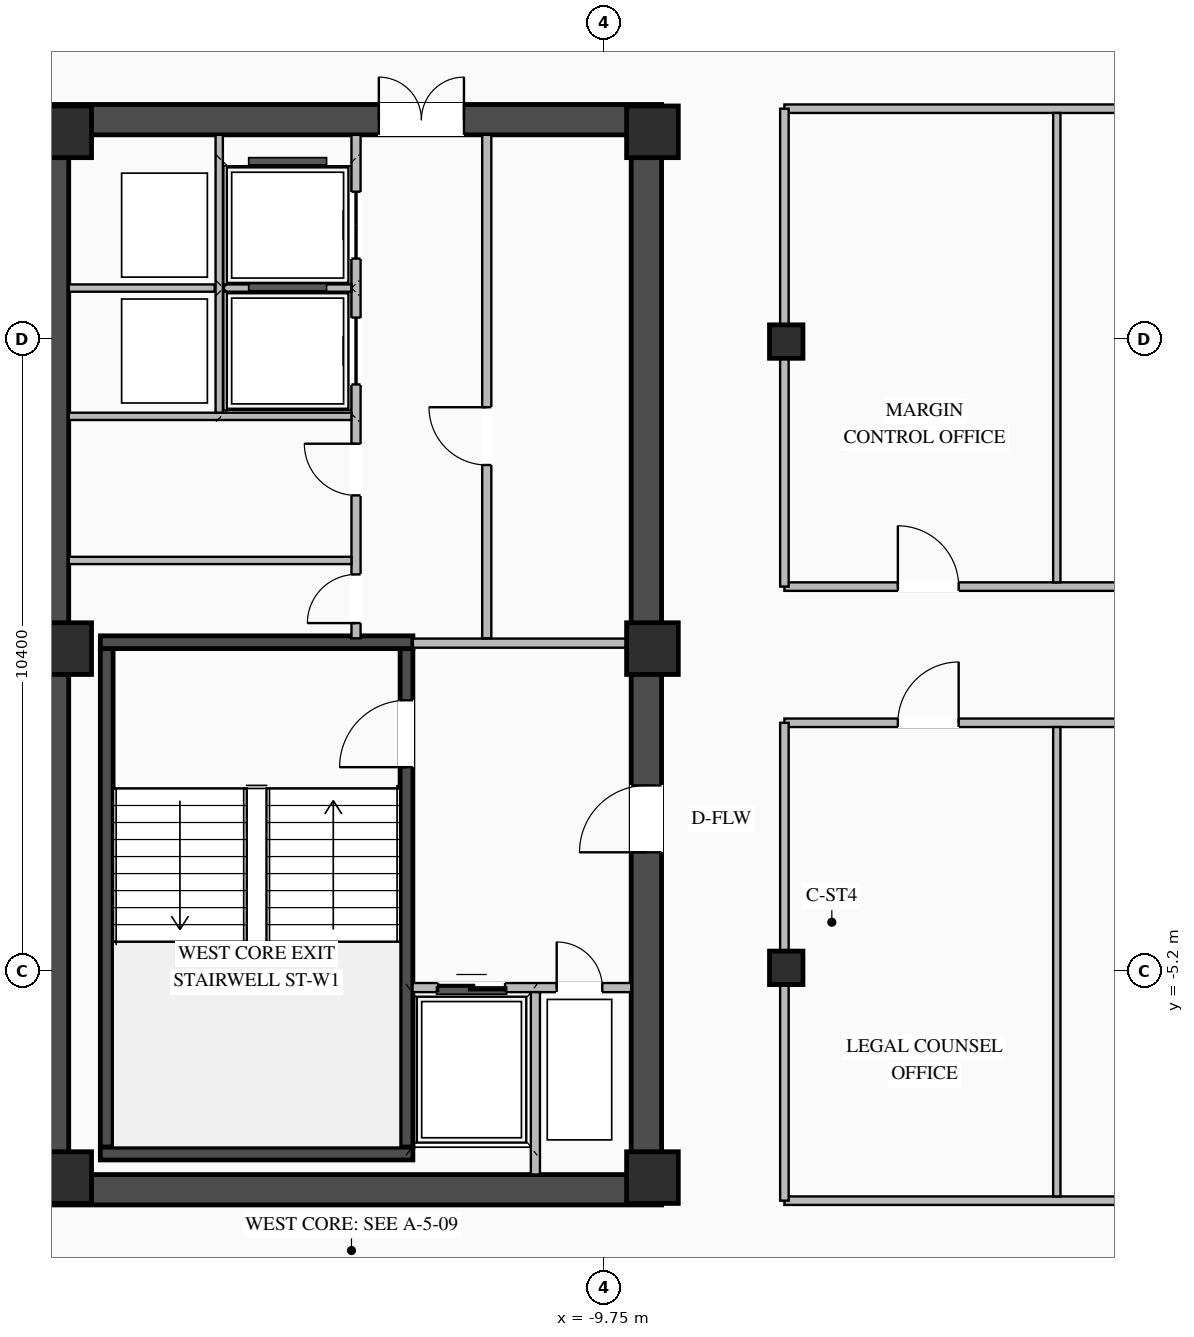
"""IFC4 building model, lengths in metres.
Left out: names, types, materials, properties, quantities, classifications, styles, units other than length and angle.
Written with IfcOpenShell. Run it as: python <this file> out.ifc"""

import sys

from ifc_helpers import new_model, si_unit, direction, frame, frame_2d, origin, origin_2d, place, context, subcontext, project, spatial, rectangle, i_section, extrude, element, fill, save


model = new_model("IFC4")
c1 = context("Model", 3, precision=1e-05, world=origin(), true_north=direction((0.0, 1.0)))
c2 = subcontext(c1, "Body", "Model", "MODEL_VIEW")
j1 = project(units=[si_unit("LENGTHUNIT", "METRE"), si_unit("PLANEANGLEUNIT", "RADIAN")], contexts=[c1])
p1 = place(None, origin())
s1 = spatial("IfcSite", under=j1, at=p1, CompositionType="ELEMENT")
p2 = place(p1, origin())
s2 = spatial("IfcBuilding", under=s1, at=p2, CompositionType="ELEMENT")
p3 = place(p2, frame((0.0, 0.0, 229.2)))
s3 = spatial("IfcBuildingStorey", under=s2, at=p3, CompositionType="ELEMENT", Elevation=229.2)
p4 = place(p3, frame((-19.05, -8.8, 0.0), z_axis=(0.0, 0.0, 1.0), x_axis=(1.0, 0.0, 0.0)))
e1 = element("IfcWall", 1, at=p4, inside=s3, PredefinedType="SHEAR", context=c2, shape_type="SweptSolid", body=[
    extrude(rectangle(XDim=10.25, YDim=0.5, at=frame_2d((5.125, 0.0))), origin(), (0.0, 0.0, 1.0), 3.27),
])
p5 = place(p3, frame((-19.05, 8.8, 0.0), z_axis=(0.0, 0.0, 1.0), x_axis=(1.0, 0.0, 0.0)))
e2 = element("IfcWall", 2, at=p5, inside=s3, PredefinedType="SHEAR", context=c2, shape_type="SweptSolid", body=[
    extrude(rectangle(XDim=10.25, YDim=0.5, at=frame_2d((5.125, 0.0))), origin(), (0.0, 0.0, 1.0), 3.27),
])
p6 = place(p5, frame((5.6, 0.0, 0.0)))
e3 = element("IfcOpeningElement", 3, at=p6, cuts=e2, PredefinedType="OPENING", context=c2, shape_type="SweptSolid", body=[
    extrude(rectangle(XDim=1.4, YDim=2.05, at=frame_2d((0.7, 1.025))), frame((0.0, 0.26, 0.0), z_axis=(0.0, -1.0, 0.0), x_axis=(1.0, 0.0, 0.0)), (0.0, 0.0, 1.0), 0.52),
])
p7 = place(p3, frame((-18.8, -8.55, 0.0), z_axis=(0.0, 0.0, 1.0), x_axis=(0.0, 1.0, 0.0)))
e4 = element("IfcWall", 4, at=p7, inside=s3, PredefinedType="SHEAR", context=c2, shape_type="SweptSolid", body=[
    extrude(rectangle(XDim=17.1, YDim=0.5, at=frame_2d((8.55, 0.0))), origin(), (0.0, 0.0, 1.0), 3.27),
])
p8 = place(p3, frame((-9.05, -8.55, 0.0), z_axis=(0.0, 0.0, 1.0), x_axis=(0.0, 1.0, 0.0)))
e5 = element("IfcWall", 5, at=p8, inside=s3, PredefinedType="SHEAR", context=c2, shape_type="SweptSolid", body=[
    extrude(rectangle(XDim=17.1, YDim=0.5, at=frame_2d((8.55, 0.0))), origin(), (0.0, 0.0, 1.0), 3.27),
])
p9 = place(p8, frame((5.3, 0.0, 0.0)))
e6 = element("IfcOpeningElement", 6, at=p9, cuts=e5, PredefinedType="OPENING", context=c2, shape_type="SweptSolid", body=[
    extrude(rectangle(XDim=1.1, YDim=2.08, at=frame_2d((0.55, 1.04))), frame((0.0, 0.26, 0.0), z_axis=(0.0, -1.0, 0.0), x_axis=(1.0, 0.0, 0.0)), (0.0, 0.0, 1.0), 0.52),
])
p10 = place(p3, frame((-12.995, -8.1, 0.0), z_axis=(0.0, 0.0, 1.0), x_axis=(0.0, 1.0, 0.0)))
e7 = element("IfcWall", 7, at=p10, inside=s3, PredefinedType="SHEAR", context=c2, shape_type="SweptSolid", body=[
    extrude(rectangle(XDim=8.2, YDim=0.21, at=frame_2d((4.1, 0.0))), origin(), (0.0, 0.0, 1.0), 3.27),
])
p11 = place(p10, frame((6.25, 0.0, 0.0)))
e8 = element("IfcOpeningElement", 8, at=p11, cuts=e7, PredefinedType="OPENING", context=c2, shape_type="SweptSolid", body=[
    extrude(rectangle(XDim=1.1, YDim=2.15, at=frame_2d((0.55, 1.075))), frame((0.0, 0.115, 0.0), z_axis=(0.0, -1.0, 0.0), x_axis=(1.0, 0.0, 0.0)), (0.0, 0.0, 1.0), 0.23),
])
p12 = place(p3, frame((-17.925, -8.1, 0.0), z_axis=(0.0, 0.0, 1.0), x_axis=(0.0, 1.0, 0.0)))
e9 = element("IfcWall", 9, at=p12, inside=s3, PredefinedType="SHEAR", context=c2, shape_type="SweptSolid", body=[
    extrude(rectangle(XDim=8.2, YDim=0.21, at=frame_2d((4.1, 0.0))), origin(), (0.0, 0.0, 1.0), 3.27),
])
for number, where, z_axis, x_axis in (
    (10, (-18.03, -8.205, 0.0), (0.0, 0.0, 1.0), (1.0, 0.0, 0.0)),
    (11, (-12.89, 0.205, 0.0), (0.0, 0.0, 1.0), (-1.0, 0.0, 0.0)),
):
    element("IfcWall", number, at=place(p3, frame(where, z_axis=z_axis, x_axis=x_axis)), inside=s3, PredefinedType="SHEAR", context=c2, shape_type="SweptSolid", body=[
        extrude(rectangle(XDim=5.14, YDim=0.21, at=frame_2d((2.57, 0.0))), origin(), (0.0, 0.0, 1.0), 3.27),
    ])
for number, where, z_axis, x_axis in (
    (12, (-8.95, -8.6, 0.0), (0.0, 0.0, 1.0), (1.0, 0.0, 0.0)),
    (13, (-8.95, 0.1, 0.0), (0.0, 0.0, 1.0), (1.0, 0.0, 0.0)),
    (14, (-8.95, 8.6, 0.0), (0.0, 0.0, 1.0), (1.0, 0.0, 0.0)),
    (15, (-18.6, -8.6, 0.0), (0.0, 0.0, 1.0), (1.0, 0.0, 0.0)),
    (16, (-18.6, 0.1, 0.0), (0.0, 0.0, 1.0), (1.0, 0.0, 0.0)),
    (17, (-18.6, 8.6, 0.0), (0.0, 0.0, 1.0), (1.0, 0.0, 0.0)),
):
    element("IfcColumn", number, at=place(p3, frame(where, z_axis=z_axis, x_axis=x_axis)), inside=s3, PredefinedType="COLUMN", context=c2, shape_type="SweptSolid", body=[
        extrude(rectangle(XDim=0.85, YDim=0.85, at=origin_2d()), origin(), (0.0, 0.0, 1.0), 3.45),
    ])
for number, where, z_axis, x_axis in (
    (18, (-6.75, -5.15, 0.0), (0.0, 0.0, 1.0), (1.0, 0.0, 0.0)),
    (19, (-6.75, 5.15, 0.0), (0.0, 0.0, 1.0), (1.0, 0.0, 0.0)),
):
    element("IfcColumn", number, at=place(p3, frame(where, z_axis=z_axis, x_axis=x_axis)), inside=s3, PredefinedType="COLUMN", context=c2, shape_type="SweptSolid", body=[
        extrude(i_section(OverallWidth=0.55, OverallDepth=0.55, WebThickness=0.024, FlangeThickness=0.036, at=origin_2d()), origin(), (0.0, 0.0, 1.0), 3.45),
    ])
p13 = place(p3, frame((-12.895, -5.475, 0.0), z_axis=(0.0, 0.0, 1.0), x_axis=(1.0, 0.0, 0.0)))
e20 = element("IfcWall", 20, at=p13, inside=s3, PredefinedType="STANDARD", context=c2, shape_type="SweptSolid", body=[
    extrude(rectangle(XDim=3.595, YDim=0.15, at=frame_2d((1.797, 0.0))), origin(), (0.0, 0.0, 1.0), 3.25),
])
p14 = place(p13, frame((0.42, 0.0, 0.0)))
e21 = element("IfcOpeningElement", 21, at=p14, cuts=e20, PredefinedType="OPENING", context=c2, shape_type="SweptSolid", body=[
    extrude(rectangle(XDim=1.1, YDim=2.15, at=frame_2d((0.55, 1.075))), frame((0.0, 0.085, 0.0), z_axis=(0.0, -1.0, 0.0), x_axis=(1.0, 0.0, 0.0)), (0.0, 0.0, 1.0), 0.17),
])
p15 = place(p13, frame((2.37, 0.0, 0.0)))
e22 = element("IfcOpeningElement", 22, at=p15, cuts=e20, PredefinedType="OPENING", context=c2, shape_type="SweptSolid", body=[
    extrude(rectangle(XDim=0.75, YDim=2.05, at=frame_2d((0.375, 1.025))), frame((0.0, 0.085, 0.0), z_axis=(0.0, -1.0, 0.0), x_axis=(1.0, 0.0, 0.0)), (0.0, 0.0, 1.0), 0.17),
])
p16 = place(p3, frame((-10.875, -8.55, 0.0), z_axis=(0.0, 0.0, 1.0), x_axis=(0.0, 1.0, 0.0)))
e23 = element("IfcWall", 23, at=p16, inside=s3, PredefinedType="STANDARD", context=c2, shape_type="SweptSolid", body=[
    extrude(rectangle(XDim=3.0, YDim=0.15, at=frame_2d((1.5, 0.0))), origin(), (0.0, 0.0, 1.0), 3.25),
])
p17 = place(p3, frame((-12.89, 0.19, 0.0), z_axis=(0.0, 0.0, 1.0), x_axis=(1.0, 0.0, 0.0)))
e24 = element("IfcWall", 24, at=p17, inside=s3, PredefinedType="STANDARD", context=c2, shape_type="SweptSolid", body=[
    extrude(rectangle(XDim=3.59, YDim=0.15, at=frame_2d((1.795, 0.0))), origin(), (0.0, 0.0, 1.0), 2.645),
])
p18 = place(p3, frame((-11.675, 0.27, 0.0), z_axis=(0.0, 0.0, 1.0), x_axis=(0.0, 1.0, 0.0)))
e25 = element("IfcWall", 25, at=p18, inside=s3, PredefinedType="STANDARD", context=c2, shape_type="SweptSolid", body=[
    extrude(rectangle(XDim=8.28, YDim=0.15, at=frame_2d((4.14, 0.0))), origin(), (0.0, 0.0, 1.0), 3.25),
])
p19 = place(p18, frame((2.85, 0.0, 0.0)))
e26 = element("IfcOpeningElement", 26, at=p19, cuts=e25, PredefinedType="OPENING", context=c2, shape_type="SweptSolid", body=[
    extrude(rectangle(XDim=0.95, YDim=2.05, at=frame_2d((0.475, 1.025))), frame((0.0, 0.085, 0.0), z_axis=(0.0, -1.0, 0.0), x_axis=(1.0, 0.0, 0.0)), (0.0, 0.0, 1.0), 0.17),
])
p20 = place(p3, frame((-13.825, 0.27, 0.0), z_axis=(0.0, 0.0, 1.0), x_axis=(0.0, 1.0, 0.0)))
e27 = element("IfcWall", 27, at=p20, inside=s3, PredefinedType="STANDARD", context=c2, shape_type="SweptSolid", body=[
    extrude(rectangle(XDim=8.28, YDim=0.15, at=frame_2d((4.14, 0.0))), origin(), (0.0, 0.0, 1.0), 3.25),
])
p21 = place(p20, frame((4.175, 0.0, 0.0)))
e28 = element("IfcOpeningElement", 28, at=p21, cuts=e27, PredefinedType="OPENING", context=c2, shape_type="SweptSolid", body=[
    extrude(rectangle(XDim=1.1, YDim=2.1, at=frame_2d((0.55, 1.05))), frame((0.0, 0.085, 0.0), z_axis=(0.0, -1.0, 0.0), x_axis=(1.0, 0.0, 0.0)), (0.0, 0.0, 1.0), 0.17),
])
p22 = place(p20, frame((6.245, 0.0, 0.0)))
e29 = element("IfcOpeningElement", 29, at=p22, cuts=e27, PredefinedType="OPENING", context=c2, shape_type="SweptSolid", body=[
    extrude(rectangle(XDim=1.1, YDim=2.1, at=frame_2d((0.55, 1.05))), frame((0.0, 0.085, 0.0), z_axis=(0.0, -1.0, 0.0), x_axis=(1.0, 0.0, 0.0)), (0.0, 0.0, 1.0), 0.17),
])
p23 = place(p20, frame((0.25, 0.0, 0.0)))
e30 = element("IfcOpeningElement", 30, at=p23, cuts=e27, PredefinedType="OPENING", context=c2, shape_type="SweptSolid", body=[
    extrude(rectangle(XDim=0.8, YDim=2.05, at=frame_2d((0.4, 1.025))), frame((0.0, 0.085, 0.0), z_axis=(0.0, -1.0, 0.0), x_axis=(1.0, 0.0, 0.0)), (0.0, 0.0, 1.0), 0.17),
])
p24 = place(p20, frame((2.35, 0.0, 0.0)))
e31 = element("IfcOpeningElement", 31, at=p24, cuts=e27, PredefinedType="OPENING", context=c2, shape_type="SweptSolid", body=[
    extrude(rectangle(XDim=0.85, YDim=2.05, at=frame_2d((0.425, 1.025))), frame((0.0, 0.085, 0.0), z_axis=(0.0, -1.0, 0.0), x_axis=(1.0, 0.0, 0.0)), (0.0, 0.0, 1.0), 0.17),
])
p25 = place(p3, frame((-18.55, 3.92, 0.0), z_axis=(0.0, 0.0, 1.0), x_axis=(1.0, 0.0, 0.0)))
e32 = element("IfcWall", 32, at=p25, inside=s3, PredefinedType="STANDARD", context=c2, shape_type="SweptSolid", body=[
    extrude(rectangle(XDim=4.65, YDim=0.12, at=frame_2d((2.325, 0.0))), origin(), (0.0, 0.0, 1.0), 3.25),
])
p26 = place(p3, frame((-18.55, 6.03, 0.0), z_axis=(0.0, 0.0, 1.0), x_axis=(1.0, 0.0, 0.0)))
e33 = element("IfcWall", 33, at=p26, inside=s3, PredefinedType="STANDARD", context=c2, shape_type="SweptSolid", body=[
    extrude(rectangle(XDim=2.4, YDim=0.12, at=frame_2d((1.2, 0.0))), origin(), (0.0, 0.0, 1.0), 3.25),
])
p27 = place(p3, frame((-16.075, 3.98, 0.0), z_axis=(0.0, 0.0, 1.0), x_axis=(0.0, 1.0, 0.0)))
e34 = element("IfcWall", 34, at=p27, inside=s3, PredefinedType="STANDARD", context=c2, shape_type="SweptSolid", body=[
    extrude(rectangle(XDim=4.57, YDim=0.12, at=frame_2d((2.285, 0.0))), origin(), (0.0, 0.0, 1.0), 3.25),
])
p28 = place(p3, frame((-16.0, 6.03, 0.0), z_axis=(0.0, 0.0, 1.0), x_axis=(1.0, 0.0, 0.0)))
e35 = element("IfcWall", 35, at=p28, inside=s3, PredefinedType="STANDARD", context=c2, shape_type="SweptSolid", body=[
    extrude(rectangle(XDim=2.1, YDim=0.12, at=frame_2d((1.05, 0.0))), origin(), (0.0, 0.0, 1.0), 3.25),
])
p29 = place(p3, frame((-18.55, 1.55, 0.0), z_axis=(0.0, 0.0, 1.0), x_axis=(1.0, 0.0, 0.0)))
e36 = element("IfcWall", 36, at=p29, inside=s3, PredefinedType="STANDARD", context=c2, shape_type="SweptSolid", body=[
    extrude(rectangle(XDim=4.65, YDim=0.12, at=frame_2d((2.325, 0.0))), origin(), (0.0, 0.0, 1.0), 3.25),
])
p30 = place(p3, frame((-6.78, 1.12, 0.0), z_axis=(0.0, 0.0, 1.0), x_axis=(1.0, 0.0, 0.0)))
e37 = element("IfcWall", 37, at=p30, inside=s3, PredefinedType="STANDARD", context=c2, shape_type="SweptSolid", body=[
    extrude(rectangle(XDim=13.56, YDim=0.14, at=frame_2d((6.78, 0.0))), origin(), (0.0, 0.0, 1.0), 3.25),
])
p31 = place(p30, frame((1.866, 0.0, 0.0)))
e38 = element("IfcOpeningElement", 38, at=p31, cuts=e37, PredefinedType="OPENING", context=c2, shape_type="SweptSolid", body=[
    extrude(rectangle(XDim=1.0, YDim=2.08, at=frame_2d((0.5, 1.04))), frame((0.0, 0.08, 0.0), z_axis=(0.0, -1.0, 0.0), x_axis=(1.0, 0.0, 0.0)), (0.0, 0.0, 1.0), 0.16),
])
p32 = place(p30, frame((6.28, 0.0, 0.0)))
e39 = element("IfcOpeningElement", 39, at=p32, cuts=e37, PredefinedType="OPENING", context=c2, shape_type="SweptSolid", body=[
    extrude(rectangle(XDim=1.0, YDim=2.08, at=frame_2d((0.5, 1.04))), frame((0.0, 0.08, 0.0), z_axis=(0.0, -1.0, 0.0), x_axis=(1.0, 0.0, 0.0)), (0.0, 0.0, 1.0), 0.16),
])
p33 = place(p30, frame((10.694, 0.0, 0.0)))
e40 = element("IfcOpeningElement", 40, at=p33, cuts=e37, PredefinedType="OPENING", context=c2, shape_type="SweptSolid", body=[
    extrude(rectangle(XDim=1.0, YDim=2.08, at=frame_2d((0.5, 1.04))), frame((0.0, 0.08, 0.0), z_axis=(0.0, -1.0, 0.0), x_axis=(1.0, 0.0, 0.0)), (0.0, 0.0, 1.0), 0.16),
])
p34 = place(p3, frame((-6.78, 8.98, 0.0), z_axis=(0.0, 0.0, 1.0), x_axis=(1.0, 0.0, 0.0)))
e41 = element("IfcWall", 41, at=p34, inside=s3, PredefinedType="STANDARD", context=c2, shape_type="SweptSolid", body=[
    extrude(rectangle(XDim=13.56, YDim=0.14, at=frame_2d((6.78, 0.0))), origin(), (0.0, 0.0, 1.0), 3.25),
])
p35 = place(p3, frame((-6.78, 1.12, 0.0), z_axis=(0.0, 0.0, 1.0), x_axis=(0.0, 1.0, 0.0)))
e42 = element("IfcWall", 42, at=p35, inside=s3, PredefinedType="STANDARD", context=c2, shape_type="SweptSolid", body=[
    extrude(rectangle(XDim=7.86, YDim=0.14, at=frame_2d((3.93, 0.0))), origin(), (0.0, 0.0, 1.0), 2.645),
])
p36 = place(p3, frame((-2.3, 1.19, 0.0), z_axis=(0.0, 0.0, 1.0), x_axis=(0.0, 1.0, 0.0)))
e43 = element("IfcWall", 43, at=p36, inside=s3, PredefinedType="STANDARD", context=c2, shape_type="SweptSolid", body=[
    extrude(rectangle(XDim=7.72, YDim=0.12, at=frame_2d((3.86, 0.0))), origin(), (0.0, 0.0, 1.0), 3.25),
])
p37 = place(p3, frame((-6.78, -1.12, 0.0), z_axis=(0.0, 0.0, 1.0), x_axis=(1.0, 0.0, 0.0)))
e44 = element("IfcWall", 44, at=p37, inside=s3, PredefinedType="STANDARD", context=c2, shape_type="SweptSolid", body=[
    extrude(rectangle(XDim=13.56, YDim=0.14, at=frame_2d((6.78, 0.0))), origin(), (0.0, 0.0, 1.0), 3.25),
])
p38 = place(p37, frame((1.866, 0.0, 0.0)))
e45 = element("IfcOpeningElement", 45, at=p38, cuts=e44, PredefinedType="OPENING", context=c2, shape_type="SweptSolid", body=[
    extrude(rectangle(XDim=1.0, YDim=2.08, at=frame_2d((0.5, 1.04))), frame((0.0, 0.08, 0.0), z_axis=(0.0, -1.0, 0.0), x_axis=(1.0, 0.0, 0.0)), (0.0, 0.0, 1.0), 0.16),
])
p39 = place(p37, frame((6.28, 0.0, 0.0)))
e46 = element("IfcOpeningElement", 46, at=p39, cuts=e44, PredefinedType="OPENING", context=c2, shape_type="SweptSolid", body=[
    extrude(rectangle(XDim=1.0, YDim=2.08, at=frame_2d((0.5, 1.04))), frame((0.0, 0.08, 0.0), z_axis=(0.0, -1.0, 0.0), x_axis=(1.0, 0.0, 0.0)), (0.0, 0.0, 1.0), 0.16),
])
p40 = place(p37, frame((10.694, 0.0, 0.0)))
e47 = element("IfcOpeningElement", 47, at=p40, cuts=e44, PredefinedType="OPENING", context=c2, shape_type="SweptSolid", body=[
    extrude(rectangle(XDim=1.0, YDim=2.08, at=frame_2d((0.5, 1.04))), frame((0.0, 0.08, 0.0), z_axis=(0.0, -1.0, 0.0), x_axis=(1.0, 0.0, 0.0)), (0.0, 0.0, 1.0), 0.16),
])
p41 = place(p3, frame((-6.78, -8.98, 0.0), z_axis=(0.0, 0.0, 1.0), x_axis=(1.0, 0.0, 0.0)))
e48 = element("IfcWall", 48, at=p41, inside=s3, PredefinedType="STANDARD", context=c2, shape_type="SweptSolid", body=[
    extrude(rectangle(XDim=13.56, YDim=0.14, at=frame_2d((6.78, 0.0))), origin(), (0.0, 0.0, 1.0), 3.25),
])
p42 = place(p3, frame((-6.78, -8.98, 0.0), z_axis=(0.0, 0.0, 1.0), x_axis=(0.0, 1.0, 0.0)))
e49 = element("IfcWall", 49, at=p42, inside=s3, PredefinedType="STANDARD", context=c2, shape_type="SweptSolid", body=[
    extrude(rectangle(XDim=7.86, YDim=0.14, at=frame_2d((3.93, 0.0))), origin(), (0.0, 0.0, 1.0), 2.645),
])
p43 = place(p3, frame((-2.3, -8.91, 0.0), z_axis=(0.0, 0.0, 1.0), x_axis=(0.0, 1.0, 0.0)))
e50 = element("IfcWall", 50, at=p43, inside=s3, PredefinedType="STANDARD", context=c2, shape_type="SweptSolid", body=[
    extrude(rectangle(XDim=7.72, YDim=0.12, at=frame_2d((3.86, 0.0))), origin(), (0.0, 0.0, 1.0), 3.25),
])
p44 = place(p11, origin())
e51 = element("IfcDoor", 51, at=p44, inside=s3, OperationType="SINGLE_SWING_LEFT", PredefinedType="DOOR", context=c2, shape_type="SweptSolid", body=[
    extrude(rectangle(XDim=1.1, YDim=2.15, at=frame_2d((0.55, 1.075))), frame((0.0, 0.025, 0.0), z_axis=(0.0, -1.0, 0.0), x_axis=(1.0, 0.0, 0.0)), (0.0, 0.0, 1.0), 0.05),
])
fill(e8, e51)
p45 = place(p14, origin())
e52 = element("IfcDoor", 52, at=p45, inside=s3, OperationType="DOUBLE_DOOR_SLIDING", PredefinedType="DOOR", context=c2, shape_type="SweptSolid", body=[
    extrude(rectangle(XDim=1.1, YDim=2.15, at=frame_2d((0.55, 1.075))), frame((0.0, 0.025, 0.0), z_axis=(0.0, -1.0, 0.0), x_axis=(1.0, 0.0, 0.0)), (0.0, 0.0, 1.0), 0.05),
])
fill(e21, e52)
p46 = place(p15, origin())
e53 = element("IfcDoor", 53, at=p46, inside=s3, OperationType="SINGLE_SWING_LEFT", PredefinedType="DOOR", context=c2, shape_type="SweptSolid", body=[
    extrude(rectangle(XDim=0.75, YDim=2.05, at=frame_2d((0.375, 1.025))), frame((0.0, 0.025, 0.0), z_axis=(0.0, -1.0, 0.0), x_axis=(1.0, 0.0, 0.0)), (0.0, 0.0, 1.0), 0.05),
])
fill(e22, e53)
p47 = place(p9, origin())
e54 = element("IfcDoor", 54, at=p47, inside=s3, OperationType="SINGLE_SWING_LEFT", PredefinedType="DOOR", context=c2, shape_type="SweptSolid", body=[
    extrude(rectangle(XDim=1.1, YDim=2.08, at=frame_2d((0.55, 1.04))), frame((0.0, 0.205, 0.0), z_axis=(0.0, -1.0, 0.0), x_axis=(1.0, 0.0, 0.0)), (0.0, 0.0, 1.0), 0.05),
])
fill(e6, e54)
p48 = place(p6, origin())
e55 = element("IfcDoor", 55, at=p48, inside=s3, OperationType="DOUBLE_DOOR_SINGLE_SWING", PredefinedType="DOOR", context=c2, shape_type="SweptSolid", body=[
    extrude(rectangle(XDim=1.4, YDim=2.05, at=frame_2d((0.7, 1.025))), frame((0.0, 0.195, 0.0), z_axis=(0.0, -1.0, 0.0), x_axis=(1.0, 0.0, 0.0)), (0.0, 0.0, 1.0), 0.05),
])
fill(e3, e55)
p49 = place(p19, origin())
e56 = element("IfcDoor", 56, at=p49, inside=s3, OperationType="SINGLE_SWING_RIGHT", PredefinedType="DOOR", context=c2, shape_type="SweptSolid", body=[
    extrude(rectangle(XDim=0.95, YDim=2.05, at=frame_2d((0.475, 1.025))), frame((0.0, 0.025, 0.0), z_axis=(0.0, -1.0, 0.0), x_axis=(1.0, 0.0, 0.0)), (0.0, 0.0, 1.0), 0.05),
])
fill(e26, e56)
p50 = place(p21, origin())
e57 = element("IfcDoor", 57, at=p50, inside=s3, OperationType="DOUBLE_DOOR_SLIDING", PredefinedType="DOOR", context=c2, shape_type="SweptSolid", body=[
    extrude(rectangle(XDim=1.1, YDim=2.1, at=frame_2d((0.55, 1.05))), frame((0.0, 0.025, 0.0), z_axis=(0.0, -1.0, 0.0), x_axis=(1.0, 0.0, 0.0)), (0.0, 0.0, 1.0), 0.05),
])
fill(e28, e57)
p51 = place(p22, origin())
e58 = element("IfcDoor", 58, at=p51, inside=s3, OperationType="DOUBLE_DOOR_SLIDING", PredefinedType="DOOR", context=c2, shape_type="SweptSolid", body=[
    extrude(rectangle(XDim=1.1, YDim=2.1, at=frame_2d((0.55, 1.05))), frame((0.0, 0.025, 0.0), z_axis=(0.0, -1.0, 0.0), x_axis=(1.0, 0.0, 0.0)), (0.0, 0.0, 1.0), 0.05),
])
fill(e29, e58)
p52 = place(p23, origin())
e59 = element("IfcDoor", 59, at=p52, inside=s3, OperationType="SINGLE_SWING_LEFT", PredefinedType="DOOR", context=c2, shape_type="SweptSolid", body=[
    extrude(rectangle(XDim=0.8, YDim=2.05, at=frame_2d((0.4, 1.025))), frame((0.0, 0.025, 0.0), z_axis=(0.0, -1.0, 0.0), x_axis=(1.0, 0.0, 0.0)), (0.0, 0.0, 1.0), 0.05),
])
fill(e30, e59)
p53 = place(p24, origin())
e60 = element("IfcDoor", 60, at=p53, inside=s3, OperationType="SINGLE_SWING_RIGHT", PredefinedType="DOOR", context=c2, shape_type="SweptSolid", body=[
    extrude(rectangle(XDim=0.85, YDim=2.05, at=frame_2d((0.425, 1.025))), frame((0.0, 0.025, 0.0), z_axis=(0.0, -1.0, 0.0), x_axis=(1.0, 0.0, 0.0)), (0.0, 0.0, 1.0), 0.05),
])
fill(e31, e60)
p54 = place(p31, origin())
e61 = element("IfcDoor", 61, at=p54, inside=s3, OperationType="SINGLE_SWING_LEFT", PredefinedType="DOOR", context=c2, shape_type="SweptSolid", body=[
    extrude(rectangle(XDim=1.0, YDim=2.08, at=frame_2d((0.5, 1.04))), frame((0.0, 0.025, 0.0), z_axis=(0.0, -1.0, 0.0), x_axis=(1.0, 0.0, 0.0)), (0.0, 0.0, 1.0), 0.05),
])
fill(e38, e61)
p55 = place(p38, origin())
e62 = element("IfcDoor", 62, at=p55, inside=s3, OperationType="SINGLE_SWING_RIGHT", PredefinedType="DOOR", context=c2, shape_type="SweptSolid", body=[
    extrude(rectangle(XDim=1.0, YDim=2.08, at=frame_2d((0.5, 1.04))), frame((0.0, 0.025, 0.0), z_axis=(0.0, -1.0, 0.0), x_axis=(1.0, 0.0, 0.0)), (0.0, 0.0, 1.0), 0.05),
])
fill(e45, e62)
save(model, sys.argv[1])
